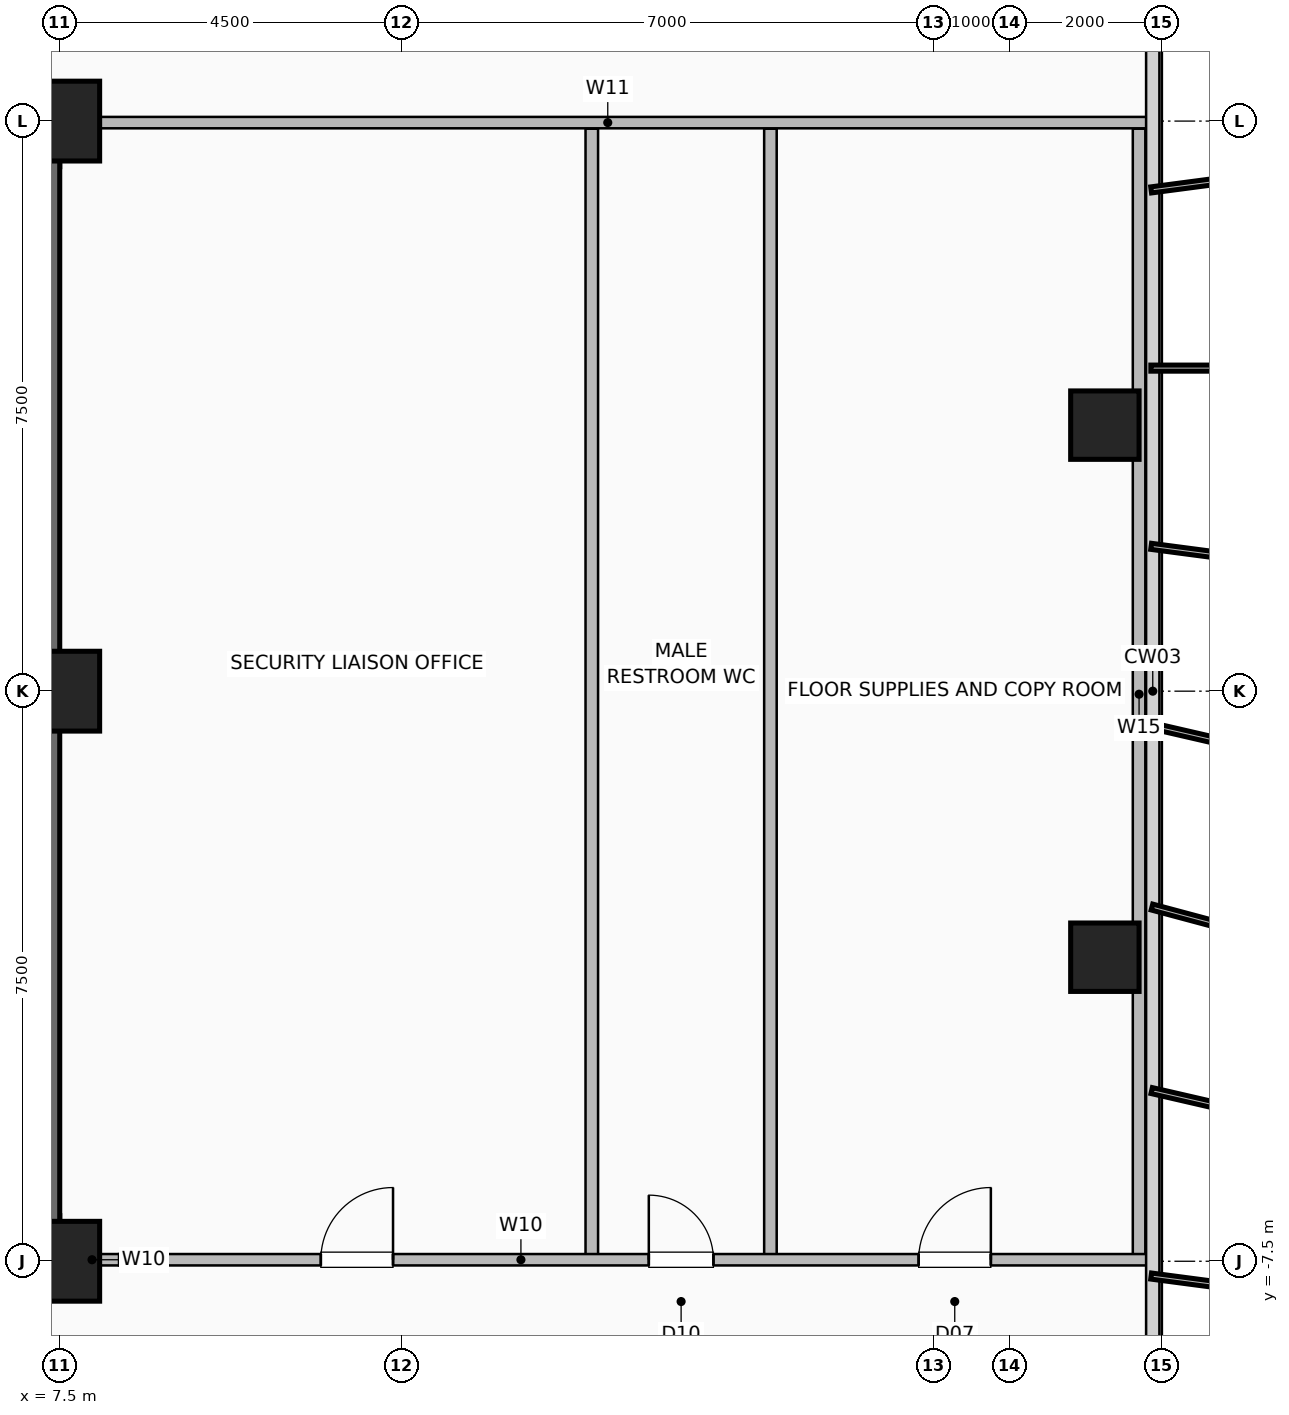
"""IFC4 building model, lengths in metres.
Left out: names, types, materials, properties, quantities, classifications, styles, units other than length and angle.
Written with IfcOpenShell. Run it as: python <this file> out.ifc"""

import sys

from ifc_helpers import new_model, si_unit, direction, frame, frame_2d, origin, origin_2d, place, context, subcontext, project, spatial, rectangle, hollow_rectangle, extrude, element, fill, save


model = new_model("IFC4")
c1 = context("Model", 3, precision=1e-05, world=origin(), true_north=direction((0.0, 1.0)))
c2 = subcontext(c1, "Body", "Model", "MODEL_VIEW")
j1 = project(units=[si_unit("LENGTHUNIT", "METRE"), si_unit("PLANEANGLEUNIT", "RADIAN")], contexts=[c1])
p1 = place(None, origin())
s1 = spatial("IfcSite", under=j1, at=p1, CompositionType="ELEMENT")
p2 = place(p1, origin())
s2 = spatial("IfcBuilding", under=s1, at=p2, CompositionType="ELEMENT")
p3 = place(p2, frame((0.0, 0.0, 148.0)))
s3 = spatial("IfcBuildingStorey", under=s2, at=p3, CompositionType="ELEMENT", Elevation=148.0)
for number, where, z_axis, x_axis in (
    (1, (7.5, -7.5, 0.0), (0.0, 0.0, 1.0), (1.0, 0.0, 0.0)),
    (2, (7.5, 0.0, 0.0), (0.0, 0.0, 1.0), (1.0, 0.0, 0.0)),
    (3, (7.5, 7.5, 0.0), (0.0, 0.0, 1.0), (1.0, 0.0, 0.0)),
):
    element("IfcColumn", number, at=place(p3, frame(where, z_axis=z_axis, x_axis=x_axis)), inside=s3, PredefinedType="COLUMN", context=c2, shape_type="SweptSolid", body=[
        extrude(hollow_rectangle(XDim=1.05, YDim=1.05, WallThickness=0.05, at=origin_2d()), origin(), (0.0, 0.0, 1.0), 3.6),
    ])
for number, where, z_axis, x_axis in (
    (4, (21.25, -3.5, 0.0), (0.0, 0.0, 1.0), (1.0, 0.0, 0.0)),
    (5, (21.25, 3.5, 0.0), (0.0, 0.0, 1.0), (1.0, 0.0, 0.0)),
):
    element("IfcColumn", number, at=place(p3, frame(where, z_axis=z_axis, x_axis=x_axis)), inside=s3, PredefinedType="COLUMN", context=c2, shape_type="SweptSolid", body=[
        extrude(hollow_rectangle(XDim=0.9, YDim=0.9, WallThickness=0.045, at=origin_2d()), origin(), (0.0, 0.0, 1.0), 3.6),
    ])
p4 = place(p3, frame((-7.5, -7.2, 0.0), z_axis=(0.0, 0.0, 1.0), x_axis=(1.0, 0.0, 0.0)))
e6 = element("IfcWall", 6, at=p4, inside=s3, PredefinedType="SHEAR", context=c2, shape_type="SweptSolid", body=[
    extrude(rectangle(XDim=15.0, YDim=0.6, at=frame_2d((7.5, 0.0))), origin(), (0.0, 0.0, 1.0), 3.36),
])
p5 = place(p4, frame((1.55, 0.0, 0.0)))
e7 = element("IfcOpeningElement", 7, at=p5, cuts=e6, PredefinedType="OPENING", context=c2, shape_type="SweptSolid", body=[
    extrude(rectangle(XDim=1.05, YDim=2.08, at=frame_2d((0.525, 1.04))), frame((0.0, 0.31, 0.0), z_axis=(0.0, -1.0, 0.0), x_axis=(1.0, 0.0, 0.0)), (0.0, 0.0, 1.0), 0.62),
])
p6 = place(p4, frame((12.4, 0.0, 0.0)))
e8 = element("IfcOpeningElement", 8, at=p6, cuts=e6, PredefinedType="OPENING", context=c2, shape_type="SweptSolid", body=[
    extrude(rectangle(XDim=1.05, YDim=2.08, at=frame_2d((0.525, 1.04))), frame((0.0, 0.31, 0.0), z_axis=(0.0, -1.0, 0.0), x_axis=(1.0, 0.0, 0.0)), (0.0, 0.0, 1.0), 0.62),
])
p7 = place(p4, frame((5.2, 0.0, 0.0)))
e9 = element("IfcOpeningElement", 9, at=p7, cuts=e6, PredefinedType="OPENING", context=c2, shape_type="SweptSolid", body=[
    extrude(rectangle(XDim=1.0, YDim=2.08, at=frame_2d((0.5, 1.04))), frame((0.0, 0.31, 0.0), z_axis=(0.0, -1.0, 0.0), x_axis=(1.0, 0.0, 0.0)), (0.0, 0.0, 1.0), 0.62),
])
p8 = place(p4, frame((8.65, 0.0, 0.0)))
e10 = element("IfcOpeningElement", 10, at=p8, cuts=e6, PredefinedType="OPENING", context=c2, shape_type="SweptSolid", body=[
    extrude(rectangle(XDim=1.0, YDim=2.08, at=frame_2d((0.5, 1.04))), frame((0.0, 0.31, 0.0), z_axis=(0.0, -1.0, 0.0), x_axis=(1.0, 0.0, 0.0)), (0.0, 0.0, 1.0), 0.62),
])
for number, where, z_axis, x_axis in (
    (11, (-7.5, 7.2, 0.0), (0.0, 0.0, 1.0), (1.0, 0.0, 0.0)),
    (12, (7.2, -7.5, 0.0), (0.0, 0.0, 1.0), (0.0, 1.0, 0.0)),
):
    element("IfcWall", number, at=place(p3, frame(where, z_axis=z_axis, x_axis=x_axis)), inside=s3, PredefinedType="SHEAR", context=c2, shape_type="SweptSolid", body=[
        extrude(rectangle(XDim=15.0, YDim=0.6, at=frame_2d((7.5, 0.0))), origin(), (0.0, 0.0, 1.0), 3.36),
    ])
p9 = place(p3, frame((7.45, -7.48, 0.0), z_axis=(0.0, 0.0, 1.0), x_axis=(1.0, 0.0, 0.0)))
e13 = element("IfcWall", 13, at=p9, inside=s3, PredefinedType="PARTITIONING", context=c2, shape_type="SweptSolid", body=[
    extrude(rectangle(XDim=0.95, YDim=0.15, at=frame_2d((0.475, 0.0))), origin(), (0.0, 0.0, 1.0), 3.36),
])
for number, where, z_axis, x_axis in (
    (14, (16.85, -7.48, 0.0), (0.0, 0.0, 1.0), (0.0, 1.0, 0.0)),
    (15, (14.5, -7.48, 0.0), (0.0, 0.0, 1.0), (0.0, 1.0, 0.0)),
    (16, (21.7, -7.48, 0.0), (0.0, 0.0, 1.0), (0.0, 1.0, 0.0)),
):
    element("IfcWall", number, at=place(p3, frame(where, z_axis=z_axis, x_axis=x_axis)), inside=s3, PredefinedType="PLUMBINGWALL", context=c2, shape_type="SweptSolid", body=[
        extrude(rectangle(XDim=14.88, YDim=0.165, at=frame_2d((7.44, 0.0))), origin(), (0.0, 0.0, 1.0), 3.36),
    ])
p10 = place(p3, frame((8.28, -7.48, 0.0), z_axis=(0.0, 0.0, 1.0), x_axis=(1.0, 0.0, 0.0)))
e17 = element("IfcWall", 17, at=p10, inside=s3, PredefinedType="PARTITIONING", context=c2, shape_type="SweptSolid", body=[
    extrude(rectangle(XDim=13.54, YDim=0.15, at=frame_2d((6.77, 0.0))), origin(), (0.0, 0.0, 1.0), 3.36),
])
p11 = place(p10, frame((2.655, 0.0, 0.0)))
e18 = element("IfcOpeningElement", 18, at=p11, cuts=e17, PredefinedType="OPENING", context=c2, shape_type="SweptSolid", body=[
    extrude(rectangle(XDim=0.95, YDim=2.06, at=frame_2d((0.475, 1.03))), frame((0.0, 0.085, 0.0), z_axis=(0.0, -1.0, 0.0), x_axis=(1.0, 0.0, 0.0)), (0.0, 0.0, 1.0), 0.17),
])
p12 = place(p10, frame((6.97, 0.0, 0.0)))
e19 = element("IfcOpeningElement", 19, at=p12, cuts=e17, PredefinedType="OPENING", context=c2, shape_type="SweptSolid", body=[
    extrude(rectangle(XDim=0.85, YDim=2.05, at=frame_2d((0.425, 1.025))), frame((0.0, 0.085, 0.0), z_axis=(0.0, -1.0, 0.0), x_axis=(1.0, 0.0, 0.0)), (0.0, 0.0, 1.0), 0.17),
])
p13 = place(p10, frame((10.52, 0.0, 0.0)))
e20 = element("IfcOpeningElement", 20, at=p13, cuts=e17, PredefinedType="OPENING", context=c2, shape_type="SweptSolid", body=[
    extrude(rectangle(XDim=0.95, YDim=2.06, at=frame_2d((0.475, 1.03))), frame((0.0, 0.085, 0.0), z_axis=(0.0, -1.0, 0.0), x_axis=(1.0, 0.0, 0.0)), (0.0, 0.0, 1.0), 0.17),
])
p14 = place(p3, frame((7.6, 7.48, 0.0), z_axis=(0.0, 0.0, 1.0), x_axis=(1.0, 0.0, 0.0)))
e21 = element("IfcWall", 21, at=p14, inside=s3, PredefinedType="PARTITIONING", context=c2, shape_type="SweptSolid", body=[
    extrude(rectangle(XDim=14.22, YDim=0.15, at=frame_2d((7.11, 0.0))), origin(), (0.0, 0.0, 1.0), 3.36),
])
p15 = place(p11, origin())
e22 = element("IfcDoor", 22, at=p15, inside=s3, OperationType="SINGLE_SWING_RIGHT", PredefinedType="DOOR", context=c2, shape_type="SweptSolid", body=[
    extrude(rectangle(XDim=0.95, YDim=2.06, at=frame_2d((0.475, 1.03))), frame((0.0, 0.025, 0.0), z_axis=(0.0, -1.0, 0.0), x_axis=(1.0, 0.0, 0.0)), (0.0, 0.0, 1.0), 0.05),
])
fill(e18, e22)
p16 = place(p12, origin())
e23 = element("IfcDoor", 23, at=p16, inside=s3, OperationType="SINGLE_SWING_LEFT", PredefinedType="DOOR", context=c2, shape_type="SweptSolid", body=[
    extrude(rectangle(XDim=0.85, YDim=2.05, at=frame_2d((0.425, 1.025))), frame((0.0, 0.025, 0.0), z_axis=(0.0, -1.0, 0.0), x_axis=(1.0, 0.0, 0.0)), (0.0, 0.0, 1.0), 0.05),
])
fill(e19, e23)
p17 = place(p13, origin())
e24 = element("IfcDoor", 24, at=p17, inside=s3, OperationType="SINGLE_SWING_RIGHT", PredefinedType="DOOR", context=c2, shape_type="SweptSolid", body=[
    extrude(rectangle(XDim=0.95, YDim=2.06, at=frame_2d((0.475, 1.03))), frame((0.0, 0.025, 0.0), z_axis=(0.0, -1.0, 0.0), x_axis=(1.0, 0.0, 0.0)), (0.0, 0.0, 1.0), 0.05),
])
fill(e20, e24)
save(model, sys.argv[1])
